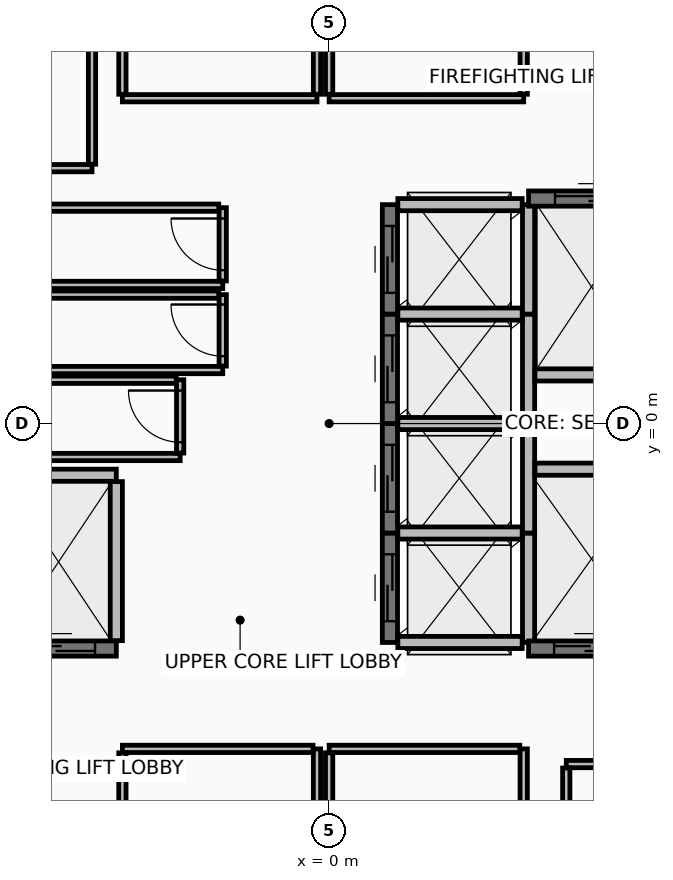
"""IFC4 building model, lengths in metres.
Left out: names, types, materials, properties, quantities, classifications, styles, units other than length and angle.
Written with IfcOpenShell. Run it as: python <this file> out.ifc"""

import sys

from ifc_helpers import new_model, si_unit, direction, frame, frame_2d, origin, place, context, subcontext, project, spatial, rectangle, extrude, element, fill, save


model = new_model("IFC4")
c1 = context("Model", 3, precision=1e-05, world=origin(), true_north=direction((0.0, 1.0)))
c2 = subcontext(c1, "Body", "Model", "MODEL_VIEW")
j1 = project(units=[si_unit("LENGTHUNIT", "METRE"), si_unit("PLANEANGLEUNIT", "RADIAN")], contexts=[c1])
p1 = place(None, origin())
s1 = spatial("IfcSite", under=j1, at=p1, CompositionType="ELEMENT")
p2 = place(p1, origin())
s2 = spatial("IfcBuilding", under=s1, at=p2, CompositionType="ELEMENT")
p3 = place(p2, frame((0.0, 0.0, 264.2)))
s3 = spatial("IfcBuildingStorey", under=s2, at=p3, CompositionType="ELEMENT", Elevation=264.2)
p4 = place(p3, frame((1.0, -3.6, 0.0), z_axis=(0.0, 0.0, 1.0), x_axis=(0.0, 1.0, 0.0)))
e1 = element("IfcWall", 1, at=p4, inside=s3, PredefinedType="SHEAR", context=c2, shape_type="SweptSolid", body=[
    extrude(rectangle(XDim=1.8, YDim=0.25, at=frame_2d((0.9, 0.0))), origin(), (0.0, 0.0, 1.0), 3.42),
])
p5 = place(p4, frame((0.35, 0.0, 0.0)))
e2 = element("IfcOpeningElement", 2, at=p5, cuts=e1, PredefinedType="OPENING", context=c2, shape_type="SweptSolid", body=[
    extrude(rectangle(XDim=1.1, YDim=2.2, at=frame_2d((0.55, 1.1))), frame((0.0, 0.135, 0.0), z_axis=(0.0, -1.0, 0.0), x_axis=(1.0, 0.0, 0.0)), (0.0, 0.0, 1.0), 0.27),
])
p6 = place(p3, frame((3.28, -3.6, 0.0), z_axis=(0.0, 0.0, 1.0), x_axis=(0.0, 1.0, 0.0)))
e3 = element("IfcWall", 3, at=p6, inside=s3, PredefinedType="PARTITIONING", context=c2, shape_type="SweptSolid", body=[
    extrude(rectangle(XDim=1.8, YDim=0.2, at=frame_2d((0.9, 0.0))), origin(), (0.0, 0.0, 1.0), 3.42),
])
for number, where, z_axis, x_axis in (
    (4, (1.13, -3.6, 0.0), (0.0, 0.0, 1.0), (1.0, 0.0, 0.0)),
    (5, (1.13, -1.8, 0.0), (0.0, 0.0, 1.0), (1.0, 0.0, 0.0)),
):
    element("IfcWall", number, at=place(p3, frame(where, z_axis=z_axis, x_axis=x_axis)), inside=s3, PredefinedType="PARTITIONING", context=c2, shape_type="SweptSolid", body=[
        extrude(rectangle(XDim=2.045, YDim=0.2, at=frame_2d((1.022, 0.0))), origin(), (0.0, 0.0, 1.0), 3.42),
    ])
p7 = place(p3, frame((1.0, -1.8, 0.0), z_axis=(0.0, 0.0, 1.0), x_axis=(0.0, 1.0, 0.0)))
e6 = element("IfcWall", 6, at=p7, inside=s3, PredefinedType="SHEAR", context=c2, shape_type="SweptSolid", body=[
    extrude(rectangle(XDim=1.8, YDim=0.25, at=frame_2d((0.9, 0.0))), origin(), (0.0, 0.0, 1.0), 3.42),
])
p8 = place(p7, frame((0.35, 0.0, 0.0)))
e7 = element("IfcOpeningElement", 7, at=p8, cuts=e6, PredefinedType="OPENING", context=c2, shape_type="SweptSolid", body=[
    extrude(rectangle(XDim=1.1, YDim=2.2, at=frame_2d((0.55, 1.1))), frame((0.0, 0.135, 0.0), z_axis=(0.0, -1.0, 0.0), x_axis=(1.0, 0.0, 0.0)), (0.0, 0.0, 1.0), 0.27),
])
p9 = place(p3, frame((3.28, -1.8, 0.0), z_axis=(0.0, 0.0, 1.0), x_axis=(0.0, 1.0, 0.0)))
e8 = element("IfcWall", 8, at=p9, inside=s3, PredefinedType="PARTITIONING", context=c2, shape_type="SweptSolid", body=[
    extrude(rectangle(XDim=1.8, YDim=0.2, at=frame_2d((0.9, 0.0))), origin(), (0.0, 0.0, 1.0), 3.42),
])
p10 = place(p3, frame((1.13, 0.0, 0.0), z_axis=(0.0, 0.0, 1.0), x_axis=(1.0, 0.0, 0.0)))
e9 = element("IfcWall", 9, at=p10, inside=s3, PredefinedType="PARTITIONING", context=c2, shape_type="SweptSolid", body=[
    extrude(rectangle(XDim=2.045, YDim=0.2, at=frame_2d((1.022, 0.0))), origin(), (0.0, 0.0, 1.0), 3.42),
])
p11 = place(p3, frame((1.0, 0.0, 0.0), z_axis=(0.0, 0.0, 1.0), x_axis=(0.0, 1.0, 0.0)))
e10 = element("IfcWall", 10, at=p11, inside=s3, PredefinedType="SHEAR", context=c2, shape_type="SweptSolid", body=[
    extrude(rectangle(XDim=1.8, YDim=0.25, at=frame_2d((0.9, 0.0))), origin(), (0.0, 0.0, 1.0), 3.42),
])
p12 = place(p11, frame((0.35, 0.0, 0.0)))
e11 = element("IfcOpeningElement", 11, at=p12, cuts=e10, PredefinedType="OPENING", context=c2, shape_type="SweptSolid", body=[
    extrude(rectangle(XDim=1.1, YDim=2.2, at=frame_2d((0.55, 1.1))), frame((0.0, 0.135, 0.0), z_axis=(0.0, -1.0, 0.0), x_axis=(1.0, 0.0, 0.0)), (0.0, 0.0, 1.0), 0.27),
])
p13 = place(p3, frame((3.28, 0.0, 0.0), z_axis=(0.0, 0.0, 1.0), x_axis=(0.0, 1.0, 0.0)))
e12 = element("IfcWall", 12, at=p13, inside=s3, PredefinedType="PARTITIONING", context=c2, shape_type="SweptSolid", body=[
    extrude(rectangle(XDim=1.8, YDim=0.2, at=frame_2d((0.9, 0.0))), origin(), (0.0, 0.0, 1.0), 3.42),
])
p14 = place(p3, frame((1.13, 1.8, 0.0), z_axis=(0.0, 0.0, 1.0), x_axis=(1.0, 0.0, 0.0)))
e13 = element("IfcWall", 13, at=p14, inside=s3, PredefinedType="PARTITIONING", context=c2, shape_type="SweptSolid", body=[
    extrude(rectangle(XDim=2.045, YDim=0.2, at=frame_2d((1.022, 0.0))), origin(), (0.0, 0.0, 1.0), 3.42),
])
p15 = place(p3, frame((1.0, 1.8, 0.0), z_axis=(0.0, 0.0, 1.0), x_axis=(0.0, 1.0, 0.0)))
e14 = element("IfcWall", 14, at=p15, inside=s3, PredefinedType="SHEAR", context=c2, shape_type="SweptSolid", body=[
    extrude(rectangle(XDim=1.8, YDim=0.25, at=frame_2d((0.9, 0.0))), origin(), (0.0, 0.0, 1.0), 3.42),
])
p16 = place(p15, frame((0.35, 0.0, 0.0)))
e15 = element("IfcOpeningElement", 15, at=p16, cuts=e14, PredefinedType="OPENING", context=c2, shape_type="SweptSolid", body=[
    extrude(rectangle(XDim=1.1, YDim=2.2, at=frame_2d((0.55, 1.1))), frame((0.0, 0.135, 0.0), z_axis=(0.0, -1.0, 0.0), x_axis=(1.0, 0.0, 0.0)), (0.0, 0.0, 1.0), 0.27),
])
p17 = place(p3, frame((3.28, 1.8, 0.0), z_axis=(0.0, 0.0, 1.0), x_axis=(0.0, 1.0, 0.0)))
e16 = element("IfcWall", 16, at=p17, inside=s3, PredefinedType="PARTITIONING", context=c2, shape_type="SweptSolid", body=[
    extrude(rectangle(XDim=1.8, YDim=0.2, at=frame_2d((0.9, 0.0))), origin(), (0.0, 0.0, 1.0), 3.42),
])
p18 = place(p3, frame((1.13, 3.6, 0.0), z_axis=(0.0, 0.0, 1.0), x_axis=(1.0, 0.0, 0.0)))
e17 = element("IfcWall", 17, at=p18, inside=s3, PredefinedType="PARTITIONING", context=c2, shape_type="SweptSolid", body=[
    extrude(rectangle(XDim=2.045, YDim=0.2, at=frame_2d((1.022, 0.0))), origin(), (0.0, 0.0, 1.0), 2.715),
])
p19 = place(p3, frame((-5.4, -3.7, 0.0), z_axis=(0.0, 0.0, 1.0), x_axis=(1.0, 0.0, 0.0)))
e18 = element("IfcWall", 18, at=p19, inside=s3, PredefinedType="SHEAR", context=c2, shape_type="SweptSolid", body=[
    extrude(rectangle(XDim=1.9, YDim=0.25, at=frame_2d((0.95, 0.0))), origin(), (0.0, 0.0, 1.0), 3.42),
])
p20 = place(p19, frame((0.35, 0.0, 0.0)))
e19 = element("IfcOpeningElement", 19, at=p20, cuts=e18, PredefinedType="OPENING", context=c2, shape_type="SweptSolid", body=[
    extrude(rectangle(XDim=1.2, YDim=2.2, at=frame_2d((0.6, 1.1))), frame((0.0, 0.135, 0.0), z_axis=(0.0, -1.0, 0.0), x_axis=(1.0, 0.0, 0.0)), (0.0, 0.0, 1.0), 0.27),
])
p21 = place(p3, frame((-5.27, -0.85, 0.0), z_axis=(0.0, 0.0, 1.0), x_axis=(1.0, 0.0, 0.0)))
e20 = element("IfcWall", 20, at=p21, inside=s3, PredefinedType="PARTITIONING", context=c2, shape_type="SweptSolid", body=[
    extrude(rectangle(XDim=1.77, YDim=0.2, at=frame_2d((0.885, 0.0))), origin(), (0.0, 0.0, 1.0), 3.42),
])
p22 = place(p3, frame((-3.5, -3.57, 0.0), z_axis=(0.0, 0.0, 1.0), x_axis=(0.0, 1.0, 0.0)))
e21 = element("IfcWall", 21, at=p22, inside=s3, PredefinedType="PARTITIONING", context=c2, shape_type="SweptSolid", body=[
    extrude(rectangle(XDim=2.615, YDim=0.2, at=frame_2d((1.308, 0.0))), origin(), (0.0, 0.0, 1.0), 3.42),
])
p23 = place(p3, frame((3.28, 3.7, 0.0), z_axis=(0.0, 0.0, 1.0), x_axis=(1.0, 0.0, 0.0)))
e22 = element("IfcWall", 22, at=p23, inside=s3, PredefinedType="SHEAR", context=c2, shape_type="SweptSolid", body=[
    extrude(rectangle(XDim=2.07, YDim=0.25, at=frame_2d((1.035, 0.0))), origin(), (0.0, 0.0, 1.0), 3.42),
])
p24 = place(p23, frame((0.435, 0.0, 0.0)))
e23 = element("IfcOpeningElement", 23, at=p24, cuts=e22, PredefinedType="OPENING", context=c2, shape_type="SweptSolid", body=[
    extrude(rectangle(XDim=1.2, YDim=2.2, at=frame_2d((0.6, 1.1))), frame((0.0, 0.135, 0.0), z_axis=(0.0, -1.0, 0.0), x_axis=(1.0, 0.0, 0.0)), (0.0, 0.0, 1.0), 0.27),
])
p25 = place(p3, frame((3.385, 0.8, 0.0), z_axis=(0.0, 0.0, 1.0), x_axis=(1.0, 0.0, 0.0)))
e24 = element("IfcWall", 24, at=p25, inside=s3, PredefinedType="PARTITIONING", context=c2, shape_type="SweptSolid", body=[
    extrude(rectangle(XDim=1.835, YDim=0.2, at=frame_2d((0.917, 0.0))), origin(), (0.0, 0.0, 1.0), 3.42),
])
p26 = place(p3, frame((3.28, -3.7, 0.0), z_axis=(0.0, 0.0, 1.0), x_axis=(1.0, 0.0, 0.0)))
e25 = element("IfcWall", 25, at=p26, inside=s3, PredefinedType="SHEAR", context=c2, shape_type="SweptSolid", body=[
    extrude(rectangle(XDim=1.94, YDim=0.25, at=frame_2d((0.97, 0.0))), origin(), (0.0, 0.0, 1.0), 3.42),
])
p27 = place(p26, frame((0.42, 0.0, 0.0)))
e26 = element("IfcOpeningElement", 26, at=p27, cuts=e25, PredefinedType="OPENING", context=c2, shape_type="SweptSolid", body=[
    extrude(rectangle(XDim=1.1, YDim=2.2, at=frame_2d((0.55, 1.1))), frame((0.0, 0.135, 0.0), z_axis=(0.0, -1.0, 0.0), x_axis=(1.0, 0.0, 0.0)), (0.0, 0.0, 1.0), 0.27),
])
p28 = place(p3, frame((3.385, -0.75, 0.0), z_axis=(0.0, 0.0, 1.0), x_axis=(1.0, 0.0, 0.0)))
e27 = element("IfcWall", 27, at=p28, inside=s3, PredefinedType="PARTITIONING", context=c2, shape_type="SweptSolid", body=[
    extrude(rectangle(XDim=1.835, YDim=0.2, at=frame_2d((0.917, 0.0))), origin(), (0.0, 0.0, 1.0), 3.42),
])
p29 = place(p3, frame((-5.22, 2.28, 0.0), z_axis=(0.0, 0.0, 1.0), x_axis=(1.0, 0.0, 0.0)))
e28 = element("IfcWall", 28, at=p29, inside=s3, PredefinedType="PARTITIONING", context=c2, shape_type="SweptSolid", body=[
    extrude(rectangle(XDim=3.47, YDim=0.12, at=frame_2d((1.735, 0.0))), origin(), (0.0, 0.0, 1.0), 3.42),
])
p30 = place(p3, frame((-1.75, 2.345, 0.0), z_axis=(0.0, 0.0, 1.0), x_axis=(0.0, 1.0, 0.0)))
e29 = element("IfcWall", 29, at=p30, inside=s3, PredefinedType="PARTITIONING", context=c2, shape_type="SweptSolid", body=[
    extrude(rectangle(XDim=1.205, YDim=0.12, at=frame_2d((0.603, 0.0))), origin(), (0.0, 0.0, 1.0), 3.42),
])
p31 = place(p30, frame((0.177, 0.0, 0.0)))
e30 = element("IfcOpeningElement", 30, at=p31, cuts=e29, PredefinedType="OPENING", context=c2, shape_type="SweptSolid", body=[
    extrude(rectangle(XDim=0.85, YDim=2.1, at=frame_2d((0.425, 1.05))), frame((0.0, 0.07, 0.0), z_axis=(0.0, -1.0, 0.0), x_axis=(1.0, 0.0, 0.0)), (0.0, 0.0, 1.0), 0.14),
])
p32 = place(p3, frame((-1.815, 3.55, 0.0), z_axis=(0.0, 0.0, 1.0), x_axis=(-1.0, 0.0, 0.0)))
e31 = element("IfcWall", 31, at=p32, inside=s3, PredefinedType="PARTITIONING", context=c2, shape_type="SweptSolid", body=[
    extrude(rectangle(XDim=3.405, YDim=0.12, at=frame_2d((1.703, 0.0))), origin(), (0.0, 0.0, 1.0), 3.42),
])
p33 = place(p3, frame((-5.22, 0.88, 0.0), z_axis=(0.0, 0.0, 1.0), x_axis=(1.0, 0.0, 0.0)))
e32 = element("IfcWall", 32, at=p33, inside=s3, PredefinedType="PARTITIONING", context=c2, shape_type="SweptSolid", body=[
    extrude(rectangle(XDim=3.47, YDim=0.12, at=frame_2d((1.735, 0.0))), origin(), (0.0, 0.0, 1.0), 3.42),
])
p34 = place(p3, frame((-1.75, 0.945, 0.0), z_axis=(0.0, 0.0, 1.0), x_axis=(0.0, 1.0, 0.0)))
e33 = element("IfcWall", 33, at=p34, inside=s3, PredefinedType="PARTITIONING", context=c2, shape_type="SweptSolid", body=[
    extrude(rectangle(XDim=1.175, YDim=0.12, at=frame_2d((0.587, 0.0))), origin(), (0.0, 0.0, 1.0), 3.42),
])
p35 = place(p34, frame((0.163, 0.0, 0.0)))
e34 = element("IfcOpeningElement", 34, at=p35, cuts=e33, PredefinedType="OPENING", context=c2, shape_type="SweptSolid", body=[
    extrude(rectangle(XDim=0.85, YDim=2.1, at=frame_2d((0.425, 1.05))), frame((0.0, 0.07, 0.0), z_axis=(0.0, -1.0, 0.0), x_axis=(1.0, 0.0, 0.0)), (0.0, 0.0, 1.0), 0.14),
])
p36 = place(p3, frame((-1.815, 2.12, 0.0), z_axis=(0.0, 0.0, 1.0), x_axis=(-1.0, 0.0, 0.0)))
e35 = element("IfcWall", 35, at=p36, inside=s3, PredefinedType="PARTITIONING", context=c2, shape_type="SweptSolid", body=[
    extrude(rectangle(XDim=3.405, YDim=0.12, at=frame_2d((1.703, 0.0))), origin(), (0.0, 0.0, 1.0), 3.42),
])
p37 = place(p3, frame((-5.22, -0.55, 0.0), z_axis=(0.0, 0.0, 1.0), x_axis=(1.0, 0.0, 0.0)))
e36 = element("IfcWall", 36, at=p37, inside=s3, PredefinedType="PARTITIONING", context=c2, shape_type="SweptSolid", body=[
    extrude(rectangle(XDim=2.77, YDim=0.12, at=frame_2d((1.385, 0.0))), origin(), (0.0, 0.0, 1.0), 3.42),
])
p38 = place(p3, frame((-2.45, -0.485, 0.0), z_axis=(0.0, 0.0, 1.0), x_axis=(0.0, 1.0, 0.0)))
e37 = element("IfcWall", 37, at=p38, inside=s3, PredefinedType="PARTITIONING", context=c2, shape_type="SweptSolid", body=[
    extrude(rectangle(XDim=1.205, YDim=0.12, at=frame_2d((0.603, 0.0))), origin(), (0.0, 0.0, 1.0), 3.42),
])
p39 = place(p38, frame((0.178, 0.0, 0.0)))
e38 = element("IfcOpeningElement", 38, at=p39, cuts=e37, PredefinedType="OPENING", context=c2, shape_type="SweptSolid", body=[
    extrude(rectangle(XDim=0.85, YDim=2.1, at=frame_2d((0.425, 1.05))), frame((0.0, 0.07, 0.0), z_axis=(0.0, -1.0, 0.0), x_axis=(1.0, 0.0, 0.0)), (0.0, 0.0, 1.0), 0.14),
])
p40 = place(p3, frame((-2.515, 0.72, 0.0), z_axis=(0.0, 0.0, 1.0), x_axis=(-1.0, 0.0, 0.0)))
e39 = element("IfcWall", 39, at=p40, inside=s3, PredefinedType="PARTITIONING", context=c2, shape_type="SweptSolid", body=[
    extrude(rectangle(XDim=2.705, YDim=0.12, at=frame_2d((1.353, 0.0))), origin(), (0.0, 0.0, 1.0), 3.42),
])
p41 = place(p3, frame((-0.2, -7.42, 0.0), z_axis=(0.0, 0.0, 1.0), x_axis=(0.0, 1.0, 0.0)))
e40 = element("IfcWall", 40, at=p41, inside=s3, PredefinedType="PARTITIONING", context=c2, shape_type="SweptSolid", body=[
    extrude(rectangle(XDim=2.07, YDim=0.12, at=frame_2d((1.035, 0.0))), origin(), (0.0, 0.0, 1.0), 2.715),
])
p42 = place(p3, frame((-0.265, -5.35, 0.0), z_axis=(0.0, 0.0, 1.0), x_axis=(-1.0, 0.0, 0.0)))
e41 = element("IfcWall", 41, at=p42, inside=s3, PredefinedType="PARTITIONING", context=c2, shape_type="SweptSolid", body=[
    extrude(rectangle(XDim=3.135, YDim=0.12, at=frame_2d((1.567, 0.0))), origin(), (0.0, 0.0, 1.0), 2.715),
])
p43 = place(p3, frame((-3.4, -5.415, 0.0), z_axis=(0.0, 0.0, 1.0), x_axis=(0.0, -1.0, 0.0)))
e42 = element("IfcWall", 42, at=p43, inside=s3, PredefinedType="PARTITIONING", context=c2, shape_type="SweptSolid", body=[
    extrude(rectangle(XDim=2.8, YDim=0.12, at=frame_2d((1.4, 0.0))), origin(), (0.0, 0.0, 1.0), 2.715),
])
p44 = place(p3, frame((3.2, -8.215, 0.0), z_axis=(0.0, 0.0, 1.0), x_axis=(0.0, 1.0, 0.0)))
e43 = element("IfcWall", 43, at=p44, inside=s3, PredefinedType="PARTITIONING", context=c2, shape_type="SweptSolid", body=[
    extrude(rectangle(XDim=2.865, YDim=0.12, at=frame_2d((1.433, 0.0))), origin(), (0.0, 0.0, 1.0), 2.715),
])
p45 = place(p3, frame((3.135, -5.35, 0.0), z_axis=(0.0, 0.0, 1.0), x_axis=(-1.0, 0.0, 0.0)))
e44 = element("IfcWall", 44, at=p45, inside=s3, PredefinedType="PARTITIONING", context=c2, shape_type="SweptSolid", body=[
    extrude(rectangle(XDim=3.135, YDim=0.12, at=frame_2d((1.567, 0.0))), origin(), (0.0, 0.0, 1.0), 3.42),
])
p46 = place(p3, frame((0.0, -5.415, 0.0), z_axis=(0.0, 0.0, 1.0), x_axis=(0.0, -1.0, 0.0)))
e45 = element("IfcWall", 45, at=p46, inside=s3, PredefinedType="PARTITIONING", context=c2, shape_type="SweptSolid", body=[
    extrude(rectangle(XDim=2.005, YDim=0.12, at=frame_2d((1.002, 0.0))), origin(), (0.0, 0.0, 1.0), 2.715),
])
p47 = place(p3, frame((-3.4, 5.35, 0.0), z_axis=(0.0, 0.0, 1.0), x_axis=(1.0, 0.0, 0.0)))
e46 = element("IfcWall", 46, at=p47, inside=s3, PredefinedType="PARTITIONING", context=c2, shape_type="SweptSolid", body=[
    extrude(rectangle(XDim=3.2, YDim=0.12, at=frame_2d((1.6, 0.0))), origin(), (0.0, 0.0, 1.0), 3.42),
])
p48 = place(p3, frame((-0.2, 5.415, 0.0), z_axis=(0.0, 0.0, 1.0), x_axis=(0.0, 1.0, 0.0)))
e47 = element("IfcWall", 47, at=p48, inside=s3, PredefinedType="PARTITIONING", context=c2, shape_type="SweptSolid", body=[
    extrude(rectangle(XDim=2.005, YDim=0.12, at=frame_2d((1.002, 0.0))), origin(), (0.0, 0.0, 1.0), 2.715),
])
p49 = place(p3, frame((-3.4, 8.215, 0.0), z_axis=(0.0, 0.0, 1.0), x_axis=(0.0, -1.0, 0.0)))
e48 = element("IfcWall", 48, at=p49, inside=s3, PredefinedType="PARTITIONING", context=c2, shape_type="SweptSolid", body=[
    extrude(rectangle(XDim=2.8, YDim=0.12, at=frame_2d((1.4, 0.0))), origin(), (0.0, 0.0, 1.0), 2.715),
])
p50 = place(p3, frame((0.0, 5.35, 0.0), z_axis=(0.0, 0.0, 1.0), x_axis=(1.0, 0.0, 0.0)))
e49 = element("IfcWall", 49, at=p50, inside=s3, PredefinedType="PARTITIONING", context=c2, shape_type="SweptSolid", body=[
    extrude(rectangle(XDim=3.2, YDim=0.12, at=frame_2d((1.6, 0.0))), origin(), (0.0, 0.0, 1.0), 2.715),
])
p51 = place(p3, frame((3.2, 5.415, 0.0), z_axis=(0.0, 0.0, 1.0), x_axis=(0.0, 1.0, 0.0)))
e50 = element("IfcWall", 50, at=p51, inside=s3, PredefinedType="PARTITIONING", context=c2, shape_type="SweptSolid", body=[
    extrude(rectangle(XDim=2.8, YDim=0.12, at=frame_2d((1.4, 0.0))), origin(), (0.0, 0.0, 1.0), 2.715),
])
p52 = place(p3, frame((0.0, 7.42, 0.0), z_axis=(0.0, 0.0, 1.0), x_axis=(0.0, -1.0, 0.0)))
e51 = element("IfcWall", 51, at=p52, inside=s3, PredefinedType="PARTITIONING", context=c2, shape_type="SweptSolid", body=[
    extrude(rectangle(XDim=2.005, YDim=0.12, at=frame_2d((1.002, 0.0))), origin(), (0.0, 0.0, 1.0), 2.715),
])
p53 = place(p3, frame((-6.35, 4.2, 0.0), z_axis=(0.0, 0.0, 1.0), x_axis=(1.0, 0.0, 0.0)))
e52 = element("IfcWall", 52, at=p53, inside=s3, PredefinedType="PARTITIONING", context=c2, shape_type="SweptSolid", body=[
    extrude(rectangle(XDim=2.45, YDim=0.12, at=frame_2d((1.225, 0.0))), origin(), (0.0, 0.0, 1.0), 3.42),
])
p54 = place(p3, frame((-3.9, 4.265, 0.0), z_axis=(0.0, 0.0, 1.0), x_axis=(0.0, 1.0, 0.0)))
e53 = element("IfcWall", 53, at=p54, inside=s3, PredefinedType="PARTITIONING", context=c2, shape_type="SweptSolid", body=[
    extrude(rectangle(XDim=3.95, YDim=0.12, at=frame_2d((1.975, 0.0))), origin(), (0.0, 0.0, 1.0), 2.715),
])
p55 = place(p3, frame((5.635, -5.6, 0.0), z_axis=(0.0, 0.0, 1.0), x_axis=(-1.0, 0.0, 0.0)))
e54 = element("IfcWall", 54, at=p55, inside=s3, PredefinedType="PARTITIONING", context=c2, shape_type="SweptSolid", body=[
    extrude(rectangle(XDim=1.735, YDim=0.12, at=frame_2d((0.868, 0.0))), origin(), (0.0, 0.0, 1.0), 3.42),
])
p56 = place(p3, frame((3.9, -5.665, 0.0), z_axis=(0.0, 0.0, 1.0), x_axis=(0.0, -1.0, 0.0)))
e55 = element("IfcWall", 55, at=p56, inside=s3, PredefinedType="PARTITIONING", context=c2, shape_type="SweptSolid", body=[
    extrude(rectangle(XDim=2.55, YDim=0.12, at=frame_2d((1.275, 0.0))), origin(), (0.0, 0.0, 1.0), 2.715),
])
p57 = place(p5, origin())
e56 = element("IfcDoor", 56, at=p57, inside=s3, OperationType="SLIDING_TO_LEFT", PredefinedType="DOOR", context=c2, shape_type="SweptSolid", body=[
    extrude(rectangle(XDim=1.1, YDim=2.2, at=frame_2d((0.55, 1.1))), frame((0.0, 0.025, 0.0), z_axis=(0.0, -1.0, 0.0), x_axis=(1.0, 0.0, 0.0)), (0.0, 0.0, 1.0), 0.05),
])
fill(e2, e56)
p58 = place(p8, origin())
e57 = element("IfcDoor", 57, at=p58, inside=s3, OperationType="SLIDING_TO_LEFT", PredefinedType="DOOR", context=c2, shape_type="SweptSolid", body=[
    extrude(rectangle(XDim=1.1, YDim=2.2, at=frame_2d((0.55, 1.1))), frame((0.0, 0.025, 0.0), z_axis=(0.0, -1.0, 0.0), x_axis=(1.0, 0.0, 0.0)), (0.0, 0.0, 1.0), 0.05),
])
fill(e7, e57)
p59 = place(p12, origin())
e58 = element("IfcDoor", 58, at=p59, inside=s3, OperationType="SLIDING_TO_LEFT", PredefinedType="DOOR", context=c2, shape_type="SweptSolid", body=[
    extrude(rectangle(XDim=1.1, YDim=2.2, at=frame_2d((0.55, 1.1))), frame((0.0, 0.025, 0.0), z_axis=(0.0, -1.0, 0.0), x_axis=(1.0, 0.0, 0.0)), (0.0, 0.0, 1.0), 0.05),
])
fill(e11, e58)
p60 = place(p16, origin())
e59 = element("IfcDoor", 59, at=p60, inside=s3, OperationType="SLIDING_TO_LEFT", PredefinedType="DOOR", context=c2, shape_type="SweptSolid", body=[
    extrude(rectangle(XDim=1.1, YDim=2.2, at=frame_2d((0.55, 1.1))), frame((0.0, 0.025, 0.0), z_axis=(0.0, -1.0, 0.0), x_axis=(1.0, 0.0, 0.0)), (0.0, 0.0, 1.0), 0.05),
])
fill(e15, e59)
p61 = place(p20, origin())
e60 = element("IfcDoor", 60, at=p61, inside=s3, OperationType="SLIDING_TO_RIGHT", PredefinedType="DOOR", context=c2, shape_type="SweptSolid", body=[
    extrude(rectangle(XDim=1.2, YDim=2.2, at=frame_2d((0.6, 1.1))), frame((0.0, 0.025, 0.0), z_axis=(0.0, -1.0, 0.0), x_axis=(1.0, 0.0, 0.0)), (0.0, 0.0, 1.0), 0.05),
])
fill(e19, e60)
p62 = place(p24, origin())
e61 = element("IfcDoor", 61, at=p62, inside=s3, OperationType="SLIDING_TO_RIGHT", PredefinedType="DOOR", context=c2, shape_type="SweptSolid", body=[
    extrude(rectangle(XDim=1.2, YDim=2.2, at=frame_2d((0.6, 1.1))), frame((0.0, 0.025, 0.0), z_axis=(0.0, -1.0, 0.0), x_axis=(1.0, 0.0, 0.0)), (0.0, 0.0, 1.0), 0.05),
])
fill(e23, e61)
p63 = place(p27, origin())
e62 = element("IfcDoor", 62, at=p63, inside=s3, OperationType="SLIDING_TO_LEFT", PredefinedType="DOOR", context=c2, shape_type="SweptSolid", body=[
    extrude(rectangle(XDim=1.1, YDim=2.2, at=frame_2d((0.55, 1.1))), frame((0.0, 0.025, 0.0), z_axis=(0.0, -1.0, 0.0), x_axis=(1.0, 0.0, 0.0)), (0.0, 0.0, 1.0), 0.05),
])
fill(e26, e62)
p64 = place(p31, frame((0.85, 0.0, 0.0), z_axis=(0.0, 0.0, 1.0), x_axis=(-1.0, 0.0, 0.0)))
e63 = element("IfcDoor", 63, at=p64, inside=s3, OperationType="SINGLE_SWING_RIGHT", PredefinedType="DOOR", context=c2, shape_type="SweptSolid", body=[
    extrude(rectangle(XDim=0.85, YDim=2.1, at=frame_2d((0.425, 1.05))), frame((0.0, 0.025, 0.0), z_axis=(0.0, -1.0, 0.0), x_axis=(1.0, 0.0, 0.0)), (0.0, 0.0, 1.0), 0.05),
])
fill(e30, e63)
p65 = place(p35, frame((0.85, 0.0, 0.0), z_axis=(0.0, 0.0, 1.0), x_axis=(-1.0, 0.0, 0.0)))
e64 = element("IfcDoor", 64, at=p65, inside=s3, OperationType="SINGLE_SWING_RIGHT", PredefinedType="DOOR", context=c2, shape_type="SweptSolid", body=[
    extrude(rectangle(XDim=0.85, YDim=2.1, at=frame_2d((0.425, 1.05))), frame((0.0, 0.025, 0.0), z_axis=(0.0, -1.0, 0.0), x_axis=(1.0, 0.0, 0.0)), (0.0, 0.0, 1.0), 0.05),
])
fill(e34, e64)
p66 = place(p39, frame((0.85, 0.0, 0.0), z_axis=(0.0, 0.0, 1.0), x_axis=(-1.0, 0.0, 0.0)))
e65 = element("IfcDoor", 65, at=p66, inside=s3, OperationType="SINGLE_SWING_RIGHT", PredefinedType="DOOR", context=c2, shape_type="SweptSolid", body=[
    extrude(rectangle(XDim=0.85, YDim=2.1, at=frame_2d((0.425, 1.05))), frame((0.0, 0.025, 0.0), z_axis=(0.0, -1.0, 0.0), x_axis=(1.0, 0.0, 0.0)), (0.0, 0.0, 1.0), 0.05),
])
fill(e38, e65)
save(model, sys.argv[1])
